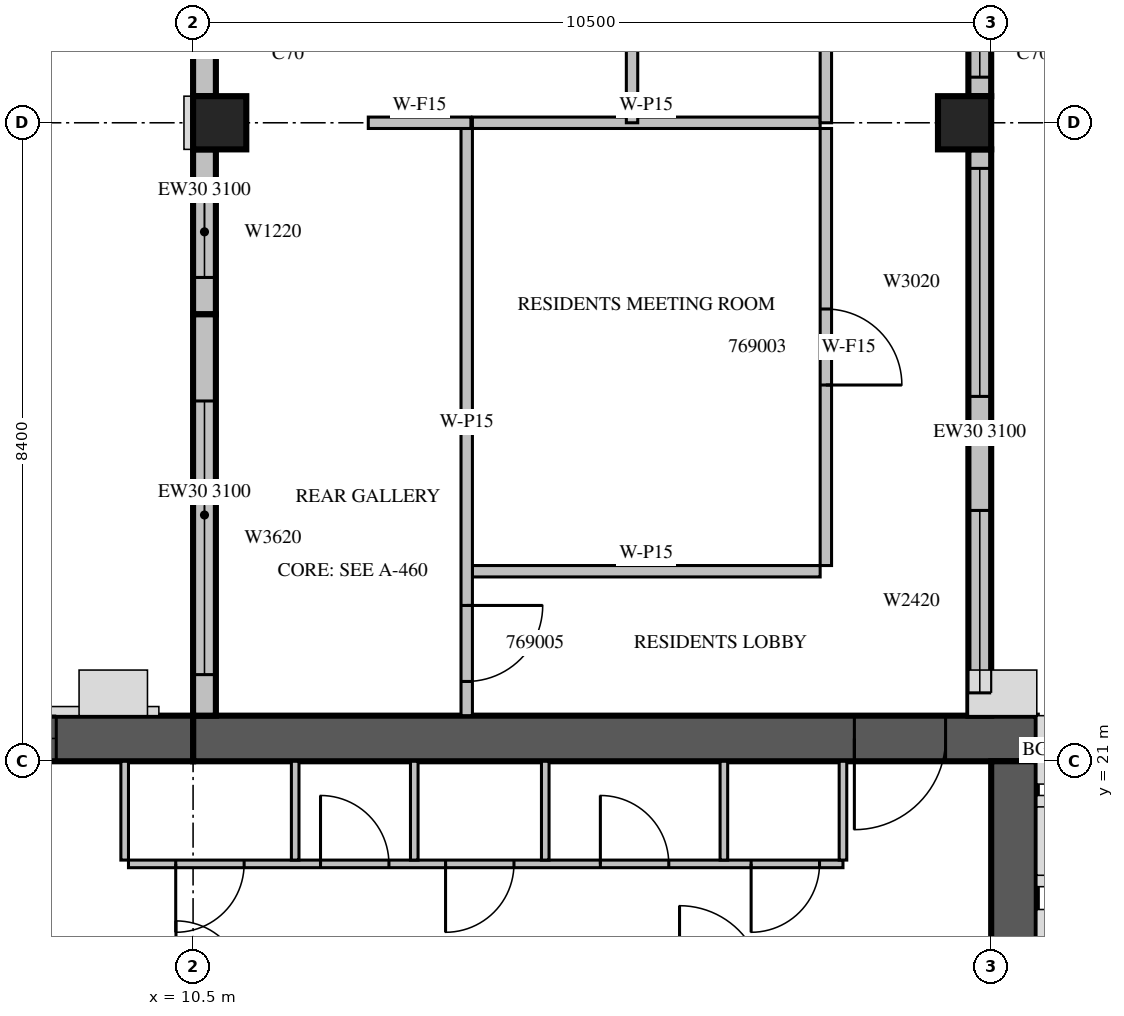
"""IFC4 building model, lengths in metres.
Left out: names, types, materials, properties, quantities, classifications, styles, units other than length and angle.
Written with IfcOpenShell. Run it as: python <this file> out.ifc"""

import sys

from ifc_helpers import new_model, si_unit, direction, frame, frame_2d, origin, origin_2d, place, context, subcontext, project, spatial, rectangle, extrude, source, transform, mapped, element, fill, save


model = new_model("IFC4")
c1 = context("Model", 3, precision=1e-05, world=origin(), true_north=direction((0.0, 1.0)))
c2 = subcontext(c1, "Body", "Model", "MODEL_VIEW")
j1 = project(units=[si_unit("LENGTHUNIT", "METRE"), si_unit("PLANEANGLEUNIT", "RADIAN")], contexts=[c1])
p1 = place(None, origin())
s1 = spatial("IfcSite", under=j1, at=p1, CompositionType="ELEMENT")
p2 = place(p1, origin())
s2 = spatial("IfcBuilding", under=s1, at=p2, CompositionType="ELEMENT")
p3 = place(p2, frame((0.0, 0.0, 302.0)))
s3 = spatial("IfcBuildingStorey", under=s2, at=p3, CompositionType="ELEMENT", Elevation=302.0)
m1 = source(origin(), c2, "Body", "SweptSolid", [
    extrude(rectangle(XDim=0.7, YDim=0.7, at=origin_2d()), origin(), (0.0, 0.0, 1.0), 3.5),
])
for number, where, z_axis, x_axis in (
    (1, (10.85, 29.4, 0.0), (0.0, 0.0, 1.0), (1.0, 0.0, 0.0)),
    (2, (20.65, 29.4, 0.0), (0.0, 0.0, 1.0), (1.0, 0.0, 0.0)),
):
    element("IfcColumn", number, at=place(p3, frame(where, z_axis=z_axis, x_axis=x_axis)), inside=s3, PredefinedType="COLUMN", context=c2, shape_type="MappedRepresentation", body=[
        mapped(m1, transform((0.0, 0.0, 0.0), scale=1.0)),
    ])
m2 = source(origin(), c2, "Body", "SweptSolid", [
    extrude(rectangle(XDim=11.1, YDim=0.6, at=frame_2d((5.55, 0.0))), origin(), (0.0, 0.0, 1.0), 3.5),
])
p4 = place(p3, frame((10.5, 21.3, 0.0), z_axis=(0.0, 0.0, 1.0), x_axis=(1.0, 0.0, 0.0)))
e3 = element("IfcWall", 3, at=p4, inside=s3, PredefinedType="SHEAR", context=c2, shape_type="MappedRepresentation", body=[
    mapped(m2, transform((0.0, 0.0, 0.0), scale=1.0)),
])
m3 = source(origin(), c2, "Body", "SweptSolid", [
    extrude(rectangle(XDim=1.2, YDim=2.1, at=frame_2d((0.6, 1.05))), frame((0.0, 0.31, 0.0), z_axis=(0.0, -1.0, 0.0), x_axis=(1.0, 0.0, 0.0)), (0.0, 0.0, 1.0), 0.62),
])
p5 = place(p4, frame((8.7, 0.0, 0.0)))
e4 = element("IfcOpeningElement", 4, at=p5, cuts=e3, PredefinedType="OPENING", context=c2, shape_type="MappedRepresentation", body=[
    mapped(m3, transform((0.0, 0.0, 0.0), scale=1.0)),
])
m4 = source(origin(), c2, "Body", "SweptSolid", [
    extrude(rectangle(XDim=10.5, YDim=0.6, at=frame_2d((5.25, 0.0))), origin(), (0.0, 0.0, 1.0), 3.5),
])
p6 = place(p3, frame((21.3, 10.5, 0.0), z_axis=(0.0, 0.0, 1.0), x_axis=(0.0, 1.0, 0.0)))
e5 = element("IfcWall", 5, at=p6, inside=s3, PredefinedType="SHEAR", context=c2, shape_type="MappedRepresentation", body=[
    mapped(m4, transform((0.0, 0.0, 0.0), scale=1.0)),
])
m5 = source(origin(), c2, "Body", "SweptSolid", [
    extrude(rectangle(XDim=1.2, YDim=2.4, at=frame_2d((0.6, 1.2))), frame((0.0, 0.31, 0.0), z_axis=(0.0, -1.0, 0.0), x_axis=(1.0, 0.0, 0.0)), (0.0, 0.0, 1.0), 0.62),
])
p7 = place(p6, frame((5.7, 0.0, 0.6)))
e6 = element("IfcOpeningElement", 6, at=p7, cuts=e5, PredefinedType="OPENING", context=c2, shape_type="MappedRepresentation", body=[
    mapped(m5, transform((0.0, 0.0, 0.0), scale=1.0)),
])
m6 = source(origin(), c2, "Body", "SweptSolid", [
    extrude(rectangle(XDim=6.6, YDim=0.6, at=frame_2d((3.3, 0.0))), origin(), (0.0, 0.0, 1.0), 3.5),
])
p8 = place(p3, frame((3.9, 21.3, 0.0), z_axis=(0.0, 0.0, 1.0), x_axis=(1.0, 0.0, 0.0)))
e7 = element("IfcWall", 7, at=p8, inside=s3, PredefinedType="SHEAR", context=c2, shape_type="MappedRepresentation", body=[
    mapped(m6, transform((0.0, 0.0, 0.0), scale=1.0)),
])
p9 = place(p8, frame((1.5, 0.0, 0.6)))
e8 = element("IfcOpeningElement", 8, at=p9, cuts=e7, PredefinedType="OPENING", context=c2, shape_type="MappedRepresentation", body=[
    mapped(m5, transform((0.0, 0.0, 0.0), scale=1.0)),
])
p10 = place(p8, frame((3.6, 0.0, 0.6)))
e9 = element("IfcOpeningElement", 9, at=p10, cuts=e7, PredefinedType="OPENING", context=c2, shape_type="MappedRepresentation", body=[
    mapped(m5, transform((0.0, 0.0, 0.0), scale=1.0)),
])
m7 = source(origin(), c2, "Body", "SweptSolid", [
    extrude(rectangle(XDim=7.45, YDim=0.3, at=frame_2d((3.725, 0.0))), origin(), (0.0, 0.0, 1.0), 3.1),
])
p11 = place(p3, frame((20.85, 21.6, 0.0), z_axis=(0.0, 0.0, 1.0), x_axis=(0.0, 1.0, 0.0)))
e10 = element("IfcWall", 10, at=p11, inside=s3, PredefinedType="STANDARD", context=c2, shape_type="MappedRepresentation", body=[
    mapped(m7, transform((0.0, 0.0, 0.0), scale=1.0)),
])
m8 = source(origin(), c2, "Body", "SweptSolid", [
    extrude(rectangle(XDim=2.4, YDim=2.0, at=frame_2d((1.2, 1.0))), frame((0.0, 0.16, 0.0), z_axis=(0.0, -1.0, 0.0), x_axis=(1.0, 0.0, 0.0)), (0.0, 0.0, 1.0), 0.32),
])
p12 = place(p11, frame((0.3, 0.0, 0.6)))
e11 = element("IfcOpeningElement", 11, at=p12, cuts=e10, PredefinedType="OPENING", context=c2, shape_type="MappedRepresentation", body=[
    mapped(m8, transform((0.0, 0.0, 0.0), scale=1.0)),
])
m9 = source(origin(), c2, "Body", "SweptSolid", [
    extrude(rectangle(XDim=3.0, YDim=2.0, at=frame_2d((1.5, 1.0))), frame((0.0, 0.16, 0.0), z_axis=(0.0, -1.0, 0.0), x_axis=(1.0, 0.0, 0.0)), (0.0, 0.0, 1.0), 0.32),
])
p13 = place(p11, frame((4.2, 0.0, 0.6)))
e12 = element("IfcOpeningElement", 12, at=p13, cuts=e10, PredefinedType="OPENING", context=c2, shape_type="MappedRepresentation", body=[
    mapped(m9, transform((0.0, 0.0, 0.0), scale=1.0)),
])
m10 = source(origin(), c2, "Body", "SweptSolid", [
    extrude(rectangle(XDim=7.7, YDim=0.3, at=frame_2d((3.85, 0.0))), origin(), (0.0, 0.0, 1.0), 3.1),
])
p14 = place(p3, frame((20.85, 29.75, 0.0), z_axis=(0.0, 0.0, 1.0), x_axis=(0.0, 1.0, 0.0)))
e13 = element("IfcWall", 13, at=p14, inside=s3, PredefinedType="STANDARD", context=c2, shape_type="MappedRepresentation", body=[
    mapped(m10, transform((0.0, 0.0, 0.0), scale=1.0)),
])
p15 = place(p14, frame((0.25, 0.0, 0.6)))
e14 = element("IfcOpeningElement", 14, at=p15, cuts=e13, PredefinedType="OPENING", context=c2, shape_type="MappedRepresentation", body=[
    mapped(m9, transform((0.0, 0.0, 0.0), scale=1.0)),
])
m11 = source(origin(), c2, "Body", "SweptSolid", [
    extrude(rectangle(XDim=1.0, YDim=2.1, at=frame_2d((0.5, 1.05))), frame((0.0, 0.16, 0.0), z_axis=(0.0, -1.0, 0.0), x_axis=(1.0, 0.0, 0.0)), (0.0, 0.0, 1.0), 0.32),
])
p16 = place(p14, frame((5.45, 0.0, 0.0)))
e15 = element("IfcOpeningElement", 15, at=p16, cuts=e13, PredefinedType="OPENING", context=c2, shape_type="MappedRepresentation", body=[
    mapped(m11, transform((0.0, 0.0, 0.0), scale=1.0)),
])
m12 = source(origin(), c2, "Body", "SweptSolid", [
    extrude(rectangle(XDim=1.33, YDim=0.3, at=frame_2d((0.665, 0.0))), origin(), (0.0, 0.0, 1.0), 3.1),
])
p17 = place(p3, frame((10.65, 31.08, 0.0), z_axis=(0.0, 0.0, 1.0), x_axis=(0.0, -1.0, 0.0)))
e16 = element("IfcWall", 16, at=p17, inside=s3, PredefinedType="STANDARD", context=c2, shape_type="MappedRepresentation", body=[
    mapped(m12, transform((0.0, 0.0, 0.0), scale=1.0)),
])
m13 = source(origin(), c2, "Body", "SweptSolid", [
    extrude(rectangle(XDim=2.17, YDim=0.3, at=frame_2d((1.085, 0.0))), origin(), (0.0, 0.0, 1.0), 3.1),
])
p18 = place(p3, frame((10.65, 29.05, 0.0), z_axis=(0.0, 0.0, 1.0), x_axis=(0.0, -1.0, 0.0)))
e17 = element("IfcWall", 17, at=p18, inside=s3, PredefinedType="STANDARD", context=c2, shape_type="MappedRepresentation", body=[
    mapped(m13, transform((0.0, 0.0, 0.0), scale=1.0)),
])
m14 = source(origin(), c2, "Body", "SweptSolid", [
    extrude(rectangle(XDim=1.2, YDim=2.0, at=frame_2d((0.6, 1.0))), frame((0.0, 0.16, 0.0), z_axis=(0.0, -1.0, 0.0), x_axis=(1.0, 0.0, 0.0)), (0.0, 0.0, 1.0), 0.32),
])
p19 = place(p18, frame((0.485, 0.0, 0.6)))
e18 = element("IfcOpeningElement", 18, at=p19, cuts=e17, PredefinedType="OPENING", context=c2, shape_type="MappedRepresentation", body=[
    mapped(m14, transform((0.0, 0.0, 0.0), scale=1.0)),
])
m15 = source(origin(), c2, "Body", "SweptSolid", [
    extrude(rectangle(XDim=5.28, YDim=0.3, at=frame_2d((2.64, 0.0))), origin(), (0.0, 0.0, 1.0), 3.1),
])
p20 = place(p3, frame((10.65, 26.88, 0.0), z_axis=(0.0, 0.0, 1.0), x_axis=(0.0, -1.0, 0.0)))
e19 = element("IfcWall", 19, at=p20, inside=s3, PredefinedType="STANDARD", context=c2, shape_type="MappedRepresentation", body=[
    mapped(m15, transform((0.0, 0.0, 0.0), scale=1.0)),
])
m16 = source(origin(), c2, "Body", "SweptSolid", [
    extrude(rectangle(XDim=3.6, YDim=2.0, at=frame_2d((1.8, 1.0))), frame((0.0, 0.16, 0.0), z_axis=(0.0, -1.0, 0.0), x_axis=(1.0, 0.0, 0.0)), (0.0, 0.0, 1.0), 0.32),
])
p21 = place(p20, frame((1.14, 0.0, 0.6)))
e20 = element("IfcOpeningElement", 20, at=p21, cuts=e19, PredefinedType="OPENING", context=c2, shape_type="MappedRepresentation", body=[
    mapped(m16, transform((0.0, 0.0, 0.0), scale=1.0)),
])
m17 = source(origin(), c2, "Body", "SweptSolid", [
    extrude(rectangle(XDim=9.4, YDim=0.1, at=frame_2d((4.7, 0.0))), origin(), (0.0, 0.0, 1.0), 3.1),
])
p22 = place(p3, frame((9.65, 19.65, 0.0), z_axis=(0.0, 0.0, 1.0), x_axis=(1.0, 0.0, 0.0)))
e21 = element("IfcWall", 21, at=p22, inside=s3, PredefinedType="PARTITIONING", context=c2, shape_type="MappedRepresentation", body=[
    mapped(m17, transform((0.0, 0.0, 0.0), scale=1.0)),
])
m18 = source(origin(), c2, "Body", "SweptSolid", [
    extrude(rectangle(XDim=0.9, YDim=2.1, at=frame_2d((0.45, 1.05))), frame((0.0, 0.06, 0.0), z_axis=(0.0, -1.0, 0.0), x_axis=(1.0, 0.0, 0.0)), (0.0, 0.0, 1.0), 0.12),
])
p23 = place(p22, frame((0.622, 0.0, 0.0)))
e22 = element("IfcOpeningElement", 22, at=p23, cuts=e21, PredefinedType="OPENING", context=c2, shape_type="MappedRepresentation", body=[
    mapped(m18, transform((0.0, 0.0, 0.0), scale=1.0)),
])
p24 = place(p22, frame((2.527, 0.0, 0.0)))
e23 = element("IfcOpeningElement", 23, at=p24, cuts=e21, PredefinedType="OPENING", context=c2, shape_type="MappedRepresentation", body=[
    mapped(m18, transform((0.0, 0.0, 0.0), scale=1.0)),
])
p25 = place(p22, frame((4.172, 0.0, 0.0)))
e24 = element("IfcOpeningElement", 24, at=p25, cuts=e21, PredefinedType="OPENING", context=c2, shape_type="MappedRepresentation", body=[
    mapped(m18, transform((0.0, 0.0, 0.0), scale=1.0)),
])
p26 = place(p22, frame((6.208, 0.0, 0.0)))
e25 = element("IfcOpeningElement", 25, at=p26, cuts=e21, PredefinedType="OPENING", context=c2, shape_type="MappedRepresentation", body=[
    mapped(m18, transform((0.0, 0.0, 0.0), scale=1.0)),
])
p27 = place(p22, frame((8.192, 0.0, 0.0)))
e26 = element("IfcOpeningElement", 26, at=p27, cuts=e21, PredefinedType="OPENING", context=c2, shape_type="MappedRepresentation", body=[
    mapped(m18, transform((0.0, 0.0, 0.0), scale=1.0)),
])
m19 = source(origin(), c2, "Body", "SweptSolid", [
    extrude(rectangle(XDim=1.3, YDim=0.1, at=frame_2d((0.65, 0.0))), origin(), (0.0, 0.0, 1.0), 3.1),
])
for number, where, z_axis, x_axis in (
    (27, (11.843, 19.7, 0.0), (0.0, 0.0, 1.0), (0.0, 1.0, 0.0)),
    (28, (13.41, 19.7, 0.0), (0.0, 0.0, 1.0), (0.0, 1.0, 0.0)),
    (29, (15.133, 19.7, 0.0), (0.0, 0.0, 1.0), (0.0, 1.0, 0.0)),
    (30, (17.483, 19.7, 0.0), (0.0, 0.0, 1.0), (0.0, 1.0, 0.0)),
    (31, (9.6, 19.7, 0.0), (0.0, 0.0, 1.0), (0.0, 1.0, 0.0)),
    (32, (19.05, 19.7, 0.0), (0.0, 0.0, 1.0), (0.0, 1.0, 0.0)),
):
    element("IfcWall", number, at=place(p3, frame(where, z_axis=z_axis, x_axis=x_axis)), inside=s3, PredefinedType="PARTITIONING", context=c2, shape_type="MappedRepresentation", body=[
        mapped(m19, transform((0.0, 0.0, 0.0), scale=1.0)),
    ])
m20 = source(origin(), c2, "Body", "SweptSolid", [
    extrude(rectangle(XDim=4.575, YDim=0.15, at=frame_2d((2.288, 0.0))), origin(), (0.0, 0.0, 1.0), 3.1),
])
for number, where, z_axis, x_axis in (
    (33, (14.175, 23.5, 0.0), (0.0, 0.0, 1.0), (1.0, 0.0, 0.0)),
    (34, (18.75, 29.4, 0.0), (0.0, 0.0, 1.0), (-1.0, 0.0, 0.0)),
):
    element("IfcWall", number, at=place(p3, frame(where, z_axis=z_axis, x_axis=x_axis)), inside=s3, PredefinedType="PARTITIONING", context=c2, shape_type="MappedRepresentation", body=[
        mapped(m20, transform((0.0, 0.0, 0.0), scale=1.0)),
    ])
m21 = source(origin(), c2, "Body", "SweptSolid", [
    extrude(rectangle(XDim=5.75, YDim=0.15, at=frame_2d((2.875, 0.0))), origin(), (0.0, 0.0, 1.0), 3.1),
])
p28 = place(p3, frame((18.825, 23.575, 0.0), z_axis=(0.0, 0.0, 1.0), x_axis=(0.0, 1.0, 0.0)))
e35 = element("IfcWall", 35, at=p28, inside=s3, PredefinedType="PARTITIONING", context=c2, shape_type="MappedRepresentation", body=[
    mapped(m21, transform((0.0, 0.0, 0.0), scale=1.0)),
])
m22 = source(origin(), c2, "Body", "SweptSolid", [
    extrude(rectangle(XDim=1.0, YDim=2.1, at=frame_2d((0.5, 1.05))), frame((0.0, 0.085, 0.0), z_axis=(0.0, -1.0, 0.0), x_axis=(1.0, 0.0, 0.0)), (0.0, 0.0, 1.0), 0.17),
])
p29 = place(p28, frame((2.375, 0.0, 0.0)))
e36 = element("IfcOpeningElement", 36, at=p29, cuts=e35, PredefinedType="OPENING", context=c2, shape_type="MappedRepresentation", body=[
    mapped(m22, transform((0.0, 0.0, 0.0), scale=1.0)),
])
m23 = source(origin(), c2, "Body", "SweptSolid", [
    extrude(rectangle(XDim=7.725, YDim=0.15, at=frame_2d((3.862, 0.0))), origin(), (0.0, 0.0, 1.0), 3.1),
])
p30 = place(p3, frame((14.1, 29.325, 0.0), z_axis=(0.0, 0.0, 1.0), x_axis=(0.0, -1.0, 0.0)))
e37 = element("IfcWall", 37, at=p30, inside=s3, PredefinedType="PARTITIONING", context=c2, shape_type="MappedRepresentation", body=[
    mapped(m23, transform((0.0, 0.0, 0.0), scale=1.0)),
])
p31 = place(p30, frame((6.275, 0.0, 0.0)))
e38 = element("IfcOpeningElement", 38, at=p31, cuts=e37, PredefinedType="OPENING", context=c2, shape_type="MappedRepresentation", body=[
    mapped(m22, transform((0.0, 0.0, 0.0), scale=1.0)),
])
m24 = source(origin(), c2, "Body", "SweptSolid", [
    extrude(rectangle(XDim=1.35, YDim=0.15, at=frame_2d((0.675, 0.0))), origin(), (0.0, 0.0, 1.0), 3.1),
])
p32 = place(p3, frame((14.155, 29.4, 0.0), z_axis=(0.0, 0.0, 1.0), x_axis=(-1.0, 0.0, 0.0)))
e39 = element("IfcWall", 39, at=p32, inside=s3, PredefinedType="PARTITIONING", context=c2, shape_type="MappedRepresentation", body=[
    mapped(m24, transform((0.0, 0.0, 0.0), scale=1.0)),
])
m25 = source(origin(), c2, "Body", "SweptSolid", [
    extrude(rectangle(XDim=8.4, YDim=0.15, at=frame_2d((4.2, 0.0))), origin(), (0.0, 0.0, 1.0), 3.1),
])
p33 = place(p3, frame((16.275, 29.4, 0.0), z_axis=(0.0, 0.0, 1.0), x_axis=(0.0, 1.0, 0.0)))
e40 = element("IfcWall", 40, at=p33, inside=s3, PredefinedType="PARTITIONING", context=c2, shape_type="MappedRepresentation", body=[
    mapped(m25, transform((0.0, 0.0, 0.0), scale=1.0)),
])
m26 = source(origin(), c2, "Body", "SweptSolid", [
    extrude(rectangle(XDim=1.2, YDim=2.1, at=frame_2d((0.6, 1.05))), frame((0.0, 0.085, 0.0), z_axis=(0.0, -1.0, 0.0), x_axis=(1.0, 0.0, 0.0)), (0.0, 0.0, 1.0), 0.17),
])
p34 = place(p33, frame((2.524, 0.0, 0.0)))
e41 = element("IfcOpeningElement", 41, at=p34, cuts=e40, PredefinedType="OPENING", context=c2, shape_type="MappedRepresentation", body=[
    mapped(m26, transform((0.0, 0.0, 0.0), scale=1.0)),
])
p35 = place(p3, frame((18.825, 29.4, 0.0), z_axis=(0.0, 0.0, 1.0), x_axis=(0.0, 1.0, 0.0)))
e42 = element("IfcWall", 42, at=p35, inside=s3, PredefinedType="PARTITIONING", context=c2, shape_type="MappedRepresentation", body=[
    mapped(m25, transform((0.0, 0.0, 0.0), scale=1.0)),
])
p36 = place(p35, frame((2.474, 0.0, 0.0)))
e43 = element("IfcOpeningElement", 43, at=p36, cuts=e42, PredefinedType="OPENING", context=c2, shape_type="MappedRepresentation", body=[
    mapped(m26, transform((0.0, 0.0, 0.0), scale=1.0)),
])
m27 = source(origin(), c2, "Body", "SweptSolid", [
    extrude(rectangle(XDim=0.9, YDim=2.1, at=frame_2d((0.45, 1.05))), frame((0.0, 0.085, 0.0), z_axis=(0.0, -1.0, 0.0), x_axis=(1.0, 0.0, 0.0)), (0.0, 0.0, 1.0), 0.17),
])
p37 = place(p35, frame((6.824, 0.0, 0.0)))
e44 = element("IfcOpeningElement", 44, at=p37, cuts=e42, PredefinedType="OPENING", context=c2, shape_type="MappedRepresentation", body=[
    mapped(m27, transform((0.0, 0.0, 0.0), scale=1.0)),
])
m28 = source(origin(), c2, "Body", "SweptSolid", [
    extrude(rectangle(XDim=2.4, YDim=2.0, at=frame_2d((1.2, 1.0))), frame((0.0, 0.03, 0.0), z_axis=(0.0, -1.0, 0.0), x_axis=(1.0, 0.0, 0.0)), (0.0, 0.0, 1.0), 0.06),
])
p38 = place(p12, origin())
e45 = element("IfcWindow", 45, at=p38, inside=s3, PartitioningType="SINGLE_PANEL", PredefinedType="WINDOW", context=c2, shape_type="MappedRepresentation", body=[
    mapped(m28, transform((0.0, 0.0, 0.0), scale=1.0)),
])
fill(e11, e45)
m29 = source(origin(), c2, "Body", "SweptSolid", [
    extrude(rectangle(XDim=3.0, YDim=2.0, at=frame_2d((1.5, 1.0))), frame((0.0, 0.03, 0.0), z_axis=(0.0, -1.0, 0.0), x_axis=(1.0, 0.0, 0.0)), (0.0, 0.0, 1.0), 0.06),
])
p39 = place(p13, origin())
e46 = element("IfcWindow", 46, at=p39, inside=s3, PartitioningType="SINGLE_PANEL", PredefinedType="WINDOW", context=c2, shape_type="MappedRepresentation", body=[
    mapped(m29, transform((0.0, 0.0, 0.0), scale=1.0)),
])
fill(e12, e46)
p40 = place(p15, origin())
e47 = element("IfcWindow", 47, at=p40, inside=s3, PartitioningType="SINGLE_PANEL", PredefinedType="WINDOW", context=c2, shape_type="MappedRepresentation", body=[
    mapped(m29, transform((0.0, 0.0, 0.0), scale=1.0)),
])
fill(e14, e47)
m30 = source(origin(), c2, "Body", "SweptSolid", [
    extrude(rectangle(XDim=1.2, YDim=2.0, at=frame_2d((0.6, 1.0))), frame((0.0, 0.03, 0.0), z_axis=(0.0, -1.0, 0.0), x_axis=(1.0, 0.0, 0.0)), (0.0, 0.0, 1.0), 0.06),
])
p41 = place(p19, origin())
e48 = element("IfcWindow", 48, at=p41, inside=s3, PartitioningType="SINGLE_PANEL", PredefinedType="WINDOW", context=c2, shape_type="MappedRepresentation", body=[
    mapped(m30, transform((0.0, 0.0, 0.0), scale=1.0)),
])
fill(e18, e48)
m31 = source(origin(), c2, "Body", "SweptSolid", [
    extrude(rectangle(XDim=3.6, YDim=2.0, at=frame_2d((1.8, 1.0))), frame((0.0, 0.03, 0.0), z_axis=(0.0, -1.0, 0.0), x_axis=(1.0, 0.0, 0.0)), (0.0, 0.0, 1.0), 0.06),
])
p42 = place(p21, origin())
e49 = element("IfcWindow", 49, at=p42, inside=s3, PartitioningType="SINGLE_PANEL", PredefinedType="WINDOW", context=c2, shape_type="MappedRepresentation", body=[
    mapped(m31, transform((0.0, 0.0, 0.0), scale=1.0)),
])
fill(e20, e49)
m32 = source(origin(), c2, "Body", "SweptSolid", [
    extrude(rectangle(XDim=0.9, YDim=2.1, at=frame_2d((0.45, 1.05))), frame((0.0, 0.025, 0.0), z_axis=(0.0, -1.0, 0.0), x_axis=(1.0, 0.0, 0.0)), (0.0, 0.0, 1.0), 0.05),
])
p43 = place(p23, origin())
e50 = element("IfcDoor", 50, at=p43, inside=s3, OperationType="SINGLE_SWING_RIGHT", PredefinedType="DOOR", context=c2, shape_type="MappedRepresentation", body=[
    mapped(m32, transform((0.0, 0.0, 0.0), scale=1.0)),
])
fill(e22, e50)
p44 = place(p24, origin())
e51 = element("IfcDoor", 51, at=p44, inside=s3, OperationType="SINGLE_SWING_LEFT", PredefinedType="DOOR", context=c2, shape_type="MappedRepresentation", body=[
    mapped(m32, transform((0.0, 0.0, 0.0), scale=1.0)),
])
fill(e23, e51)
p45 = place(p25, origin())
e52 = element("IfcDoor", 52, at=p45, inside=s3, OperationType="SINGLE_SWING_RIGHT", PredefinedType="DOOR", context=c2, shape_type="MappedRepresentation", body=[
    mapped(m32, transform((0.0, 0.0, 0.0), scale=1.0)),
])
fill(e24, e52)
p46 = place(p26, origin())
e53 = element("IfcDoor", 53, at=p46, inside=s3, OperationType="SINGLE_SWING_LEFT", PredefinedType="DOOR", context=c2, shape_type="MappedRepresentation", body=[
    mapped(m32, transform((0.0, 0.0, 0.0), scale=1.0)),
])
fill(e25, e53)
p47 = place(p27, origin())
e54 = element("IfcDoor", 54, at=p47, inside=s3, OperationType="SINGLE_SWING_RIGHT", PredefinedType="DOOR", context=c2, shape_type="MappedRepresentation", body=[
    mapped(m32, transform((0.0, 0.0, 0.0), scale=1.0)),
])
fill(e26, e54)
m33 = source(origin(), c2, "Body", "SweptSolid", [
    extrude(rectangle(XDim=1.2, YDim=2.1, at=frame_2d((0.6, 1.05))), frame((0.0, 0.025, 0.0), z_axis=(0.0, -1.0, 0.0), x_axis=(1.0, 0.0, 0.0)), (0.0, 0.0, 1.0), 0.05),
])
p48 = place(p5, origin())
e55 = element("IfcDoor", 55, at=p48, inside=s3, OperationType="SINGLE_SWING_RIGHT", PredefinedType="DOOR", context=c2, shape_type="MappedRepresentation", body=[
    mapped(m33, transform((0.0, 0.0, 0.0), scale=1.0)),
])
fill(e4, e55)
m34 = source(origin(), c2, "Body", "SweptSolid", [
    extrude(rectangle(XDim=1.2, YDim=2.4, at=frame_2d((0.6, 1.2))), frame((0.0, 0.03, 0.0), z_axis=(0.0, -1.0, 0.0), x_axis=(1.0, 0.0, 0.0)), (0.0, 0.0, 1.0), 0.06),
])
p49 = place(p10, origin())
e56 = element("IfcWindow", 56, at=p49, inside=s3, PartitioningType="SINGLE_PANEL", PredefinedType="WINDOW", context=c2, shape_type="MappedRepresentation", body=[
    mapped(m34, transform((0.0, 0.0, 0.0), scale=1.0)),
])
fill(e9, e56)
m35 = source(origin(), c2, "Body", "SweptSolid", [
    extrude(rectangle(XDim=1.0, YDim=2.1, at=frame_2d((0.5, 1.05))), frame((0.0, 0.025, 0.0), z_axis=(0.0, -1.0, 0.0), x_axis=(1.0, 0.0, 0.0)), (0.0, 0.0, 1.0), 0.05),
])
p50 = place(p29, origin())
e57 = element("IfcDoor", 57, at=p50, inside=s3, OperationType="SINGLE_SWING_RIGHT", PredefinedType="DOOR", context=c2, shape_type="MappedRepresentation", body=[
    mapped(m35, transform((0.0, 0.0, 0.0), scale=1.0)),
])
fill(e36, e57)
p51 = place(p31, origin())
e58 = element("IfcDoor", 58, at=p51, inside=s3, OperationType="SINGLE_SWING_LEFT", PredefinedType="DOOR", context=c2, shape_type="MappedRepresentation", body=[
    mapped(m35, transform((0.0, 0.0, 0.0), scale=1.0)),
])
fill(e38, e58)
save(model, sys.argv[1])
